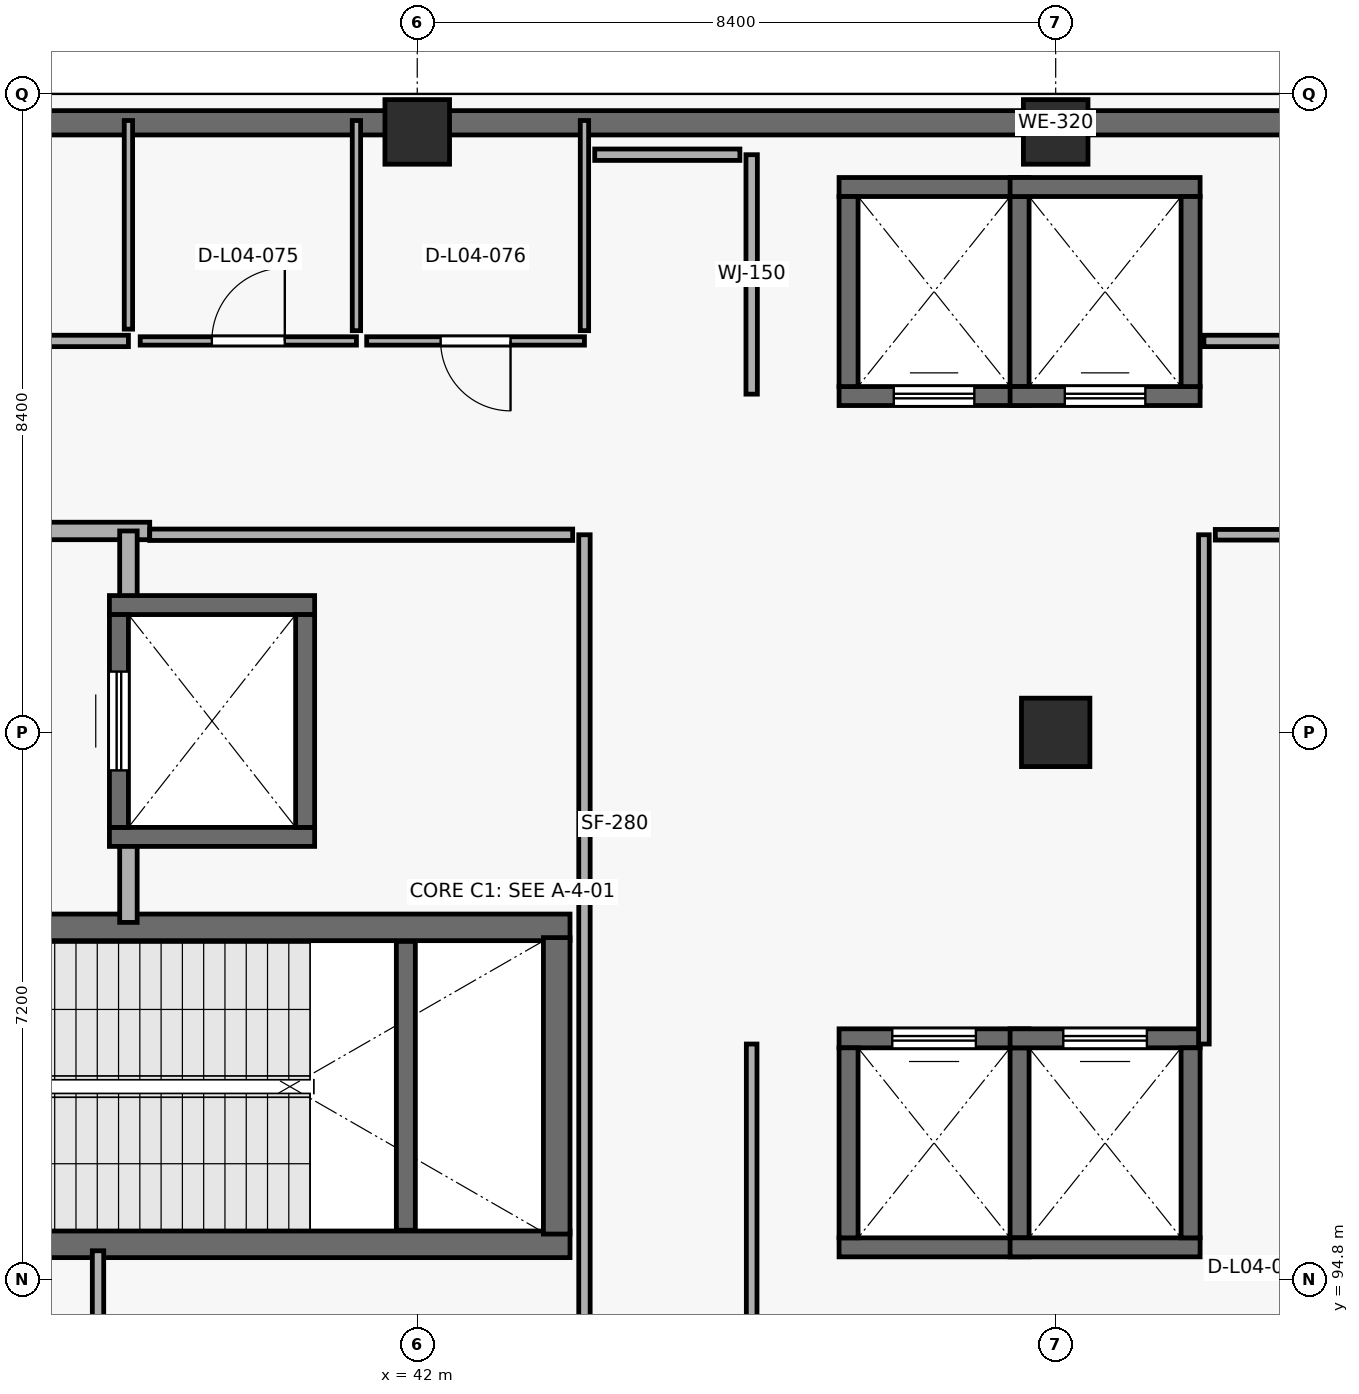
"""IFC4 building model, lengths in metres.
Left out: names, types, materials, properties, quantities, classifications, styles, units other than length and angle.
Written with IfcOpenShell. Run it as: python <this file> out.ifc"""

import sys

from ifc_helpers import new_model, si_unit, direction, frame, frame_2d, origin, origin_2d, place, context, subcontext, project, spatial, rectangle, extrude, element, fill, save


model = new_model("IFC4")
c1 = context("Model", 3, precision=1e-05, world=origin(), true_north=direction((0.0, 1.0)))
c2 = subcontext(c1, "Body", "Model", "MODEL_VIEW")
j1 = project(units=[si_unit("LENGTHUNIT", "METRE"), si_unit("PLANEANGLEUNIT", "RADIAN")], contexts=[c1])
p1 = place(None, origin())
s1 = spatial("IfcSite", under=j1, at=p1, CompositionType="ELEMENT")
p2 = place(p1, origin())
s2 = spatial("IfcBuilding", under=s1, at=p2, CompositionType="ELEMENT")
p3 = place(p2, frame((0.0, 0.0, 15.3)))
s3 = spatial("IfcBuildingStorey", under=s2, at=p3, CompositionType="ELEMENT", Elevation=15.3)
p4 = place(p3, frame((42.0, 109.9, 0.0), z_axis=(0.0, 0.0, 1.0), x_axis=(1.0, 0.0, 0.0)))
e1 = element("IfcColumn", 1, at=p4, inside=s3, PredefinedType="COLUMN", context=c2, shape_type="SweptSolid", body=[
    extrude(rectangle(XDim=0.85, YDim=0.85, at=origin_2d()), origin(), (0.0, 0.0, 1.0), 5.1),
])
p5 = place(p3, frame((50.4, 102.0, 0.0), z_axis=(0.0, 0.0, 1.0), x_axis=(1.0, 0.0, 0.0)))
e2 = element("IfcColumn", 2, at=p5, inside=s3, PredefinedType="COLUMN", context=c2, shape_type="SweptSolid", body=[
    extrude(rectangle(XDim=0.9, YDim=0.9, at=origin_2d()), origin(), (0.0, 0.0, 1.0), 5.1),
])
p6 = place(p3, frame((50.4, 109.9, 0.0), z_axis=(0.0, 0.0, 1.0), x_axis=(1.0, 0.0, 0.0)))
e3 = element("IfcColumn", 3, at=p6, inside=s3, PredefinedType="COLUMN", context=c2, shape_type="SweptSolid", body=[
    extrude(rectangle(XDim=0.85, YDim=0.85, at=origin_2d()), origin(), (0.0, 0.0, 1.0), 5.1),
])
p7 = place(p3, frame((33.6, 110.02, 0.0), z_axis=(0.0, 0.0, 1.0), x_axis=(1.0, 0.0, 0.0)))
e4 = element("IfcWall", 4, at=p7, inside=s3, PredefinedType="SOLIDWALL", context=c2, shape_type="SweptSolid", body=[
    extrude(rectangle(XDim=33.6, YDim=0.32, at=frame_2d((16.8, 0.0))), origin(), (0.0, 0.0, 1.0), 4.82),
])
p8 = place(p3, frame((34.79, 95.265, 0.0), z_axis=(0.0, 0.0, 1.0), x_axis=(1.0, 0.0, 0.0)))
e5 = element("IfcWall", 5, at=p8, inside=s3, PredefinedType="SHEAR", context=c2, shape_type="SweptSolid", body=[
    extrude(rectangle(XDim=9.22, YDim=0.35, at=frame_2d((4.61, 0.0))), origin(), (0.0, 0.0, 1.0), 4.82),
])
p9 = place(p8, frame((0.45, 0.0, 0.0)))
e6 = element("IfcOpeningElement", 6, at=p9, cuts=e5, PredefinedType="OPENING", context=c2, shape_type="SweptSolid", body=[
    extrude(rectangle(XDim=1.25, YDim=2.2, at=frame_2d((0.625, 1.1))), frame((0.0, 0.185, 0.0), z_axis=(0.0, -1.0, 0.0), x_axis=(1.0, 0.0, 0.0)), (0.0, 0.0, 1.0), 0.37),
])
p10 = place(p3, frame((44.01, 99.435, 0.0), z_axis=(0.0, 0.0, 1.0), x_axis=(-1.0, 0.0, 0.0)))
e7 = element("IfcWall", 7, at=p10, inside=s3, PredefinedType="SHEAR", context=c2, shape_type="SweptSolid", body=[
    extrude(rectangle(XDim=9.22, YDim=0.35, at=frame_2d((4.61, 0.0))), origin(), (0.0, 0.0, 1.0), 4.82),
])
p11 = place(p10, frame((7.72, 0.0, 0.0)))
e8 = element("IfcOpeningElement", 8, at=p11, cuts=e7, PredefinedType="OPENING", context=c2, shape_type="SweptSolid", body=[
    extrude(rectangle(XDim=1.2, YDim=2.2, at=frame_2d((0.6, 1.1))), frame((0.0, 0.185, 0.0), z_axis=(0.0, -1.0, 0.0), x_axis=(1.0, 0.0, 0.0)), (0.0, 0.0, 1.0), 0.37),
])
p12 = place(p3, frame((43.835, 99.3, 0.0), z_axis=(0.0, 0.0, 1.0), x_axis=(0.0, -1.0, 0.0)))
e9 = element("IfcWall", 9, at=p12, inside=s3, PredefinedType="SHEAR", context=c2, shape_type="SweptSolid", body=[
    extrude(rectangle(XDim=3.9, YDim=0.35, at=frame_2d((1.95, 0.0))), origin(), (0.0, 0.0, 1.0), 4.82),
])
p13 = place(p3, frame((41.85, 95.45, 0.0), z_axis=(0.0, 0.0, 1.0), x_axis=(0.0, 1.0, 0.0)))
e10 = element("IfcWall", 10, at=p13, inside=s3, PredefinedType="SHEAR", context=c2, shape_type="SweptSolid", body=[
    extrude(rectangle(XDim=3.8, YDim=0.25, at=frame_2d((1.9, 0.0))), origin(), (0.0, 0.0, 1.0), 2.37),
])
p14 = place(p3, frame((34.59, 104.65, 0.0), z_axis=(0.0, 0.0, 1.0), x_axis=(1.0, 0.0, 0.0)))
e11 = element("IfcWall", 11, at=p14, inside=s3, PredefinedType="PARTITIONING", context=c2, shape_type="SweptSolid", body=[
    extrude(rectangle(XDim=3.89, YDim=0.23, at=frame_2d((1.945, 0.0))), origin(), (0.0, 0.0, 1.0), 4.82),
])
p15 = place(p14, frame((1.15, 0.0, 0.0)))
e12 = element("IfcOpeningElement", 12, at=p15, cuts=e11, PredefinedType="OPENING", context=c2, shape_type="SweptSolid", body=[
    extrude(rectangle(XDim=1.2, YDim=2.2, at=frame_2d((0.6, 1.1))), frame((0.0, 0.125, 0.0), z_axis=(0.0, -1.0, 0.0), x_axis=(1.0, 0.0, 0.0)), (0.0, 0.0, 1.0), 0.25),
])
p16 = place(p3, frame((38.2, 104.65, 0.0), z_axis=(0.0, 0.0, 1.0), x_axis=(0.0, -1.0, 0.0)))
e13 = element("IfcWall", 13, at=p16, inside=s3, PredefinedType="PARTITIONING", context=c2, shape_type="SweptSolid", body=[
    extrude(rectangle(XDim=1.1, YDim=0.23, at=frame_2d((0.55, 0.0))), origin(), (0.0, 0.0, 1.0), 4.82),
])
p17 = place(p3, frame((38.2, 100.75, 0.0), z_axis=(0.0, 0.0, 1.0), x_axis=(0.0, -1.0, 0.0)))
e14 = element("IfcWall", 14, at=p17, inside=s3, PredefinedType="PARTITIONING", context=c2, shape_type="SweptSolid", body=[
    extrude(rectangle(XDim=1.25, YDim=0.23, at=frame_2d((0.625, 0.0))), origin(), (0.0, 0.0, 1.0), 4.82),
])
p18 = place(p3, frame((47.55, 95.225, 0.0), z_axis=(0.0, 0.0, 1.0), x_axis=(1.0, 0.0, 0.0)))
e15 = element("IfcWall", 15, at=p18, inside=s3, PredefinedType="SHEAR", context=c2, shape_type="SweptSolid", body=[
    extrude(rectangle(XDim=2.5, YDim=0.25, at=frame_2d((1.25, 0.0))), origin(), (0.0, 0.0, 1.0), 4.82),
])
p19 = place(p3, frame((50.05, 97.975, 0.0), z_axis=(0.0, 0.0, 1.0), x_axis=(-1.0, 0.0, 0.0)))
e16 = element("IfcWall", 16, at=p19, inside=s3, PredefinedType="SHEAR", context=c2, shape_type="SweptSolid", body=[
    extrude(rectangle(XDim=2.5, YDim=0.25, at=frame_2d((1.25, 0.0))), origin(), (0.0, 0.0, 1.0), 4.82),
])
p20 = place(p19, frame((0.7, 0.0, 0.0)))
e17 = element("IfcOpeningElement", 17, at=p20, cuts=e16, PredefinedType="OPENING", context=c2, shape_type="SweptSolid", body=[
    extrude(rectangle(XDim=1.1, YDim=2.2, at=frame_2d((0.55, 1.1))), frame((0.0, 0.135, 0.0), z_axis=(0.0, -1.0, 0.0), x_axis=(1.0, 0.0, 0.0)), (0.0, 0.0, 1.0), 0.27),
])
for number, where, z_axis, x_axis in (
    (18, (47.675, 95.35, 0.0), (0.0, 0.0, 1.0), (0.0, 1.0, 0.0)),
    (19, (49.925, 97.85, 0.0), (0.0, 0.0, 1.0), (0.0, -1.0, 0.0)),
    (20, (49.8, 95.225, 0.0), (0.0, 0.0, 1.0), (1.0, 0.0, 0.0)),
):
    element("IfcWall", number, at=place(p3, frame(where, z_axis=z_axis, x_axis=x_axis)), inside=s3, PredefinedType="SHEAR", context=c2, shape_type="SweptSolid", body=[
        extrude(rectangle(XDim=2.5, YDim=0.25, at=frame_2d((1.25, 0.0))), origin(), (0.0, 0.0, 1.0), 4.82),
    ])
p21 = place(p3, frame((52.3, 97.975, 0.0), z_axis=(0.0, 0.0, 1.0), x_axis=(-1.0, 0.0, 0.0)))
e21 = element("IfcWall", 21, at=p21, inside=s3, PredefinedType="SHEAR", context=c2, shape_type="SweptSolid", body=[
    extrude(rectangle(XDim=2.5, YDim=0.25, at=frame_2d((1.25, 0.0))), origin(), (0.0, 0.0, 1.0), 4.82),
])
p22 = place(p21, frame((0.7, 0.0, 0.0)))
e22 = element("IfcOpeningElement", 22, at=p22, cuts=e21, PredefinedType="OPENING", context=c2, shape_type="SweptSolid", body=[
    extrude(rectangle(XDim=1.1, YDim=2.2, at=frame_2d((0.55, 1.1))), frame((0.0, 0.135, 0.0), z_axis=(0.0, -1.0, 0.0), x_axis=(1.0, 0.0, 0.0)), (0.0, 0.0, 1.0), 0.27),
])
p23 = place(p3, frame((52.175, 97.85, 0.0), z_axis=(0.0, 0.0, 1.0), x_axis=(0.0, -1.0, 0.0)))
e23 = element("IfcWall", 23, at=p23, inside=s3, PredefinedType="SHEAR", context=c2, shape_type="SweptSolid", body=[
    extrude(rectangle(XDim=2.5, YDim=0.25, at=frame_2d((1.25, 0.0))), origin(), (0.0, 0.0, 1.0), 4.82),
])
p24 = place(p3, frame((47.55, 106.425, 0.0), z_axis=(0.0, 0.0, 1.0), x_axis=(1.0, 0.0, 0.0)))
e24 = element("IfcWall", 24, at=p24, inside=s3, PredefinedType="SHEAR", context=c2, shape_type="SweptSolid", body=[
    extrude(rectangle(XDim=2.5, YDim=0.25, at=frame_2d((1.25, 0.0))), origin(), (0.0, 0.0, 1.0), 4.82),
])
p25 = place(p24, frame((0.72, 0.0, 0.0)))
e25 = element("IfcOpeningElement", 25, at=p25, cuts=e24, PredefinedType="OPENING", context=c2, shape_type="SweptSolid", body=[
    extrude(rectangle(XDim=1.06, YDim=2.2, at=frame_2d((0.53, 1.1))), frame((0.0, 0.135, 0.0), z_axis=(0.0, -1.0, 0.0), x_axis=(1.0, 0.0, 0.0)), (0.0, 0.0, 1.0), 0.27),
])
for number, where, z_axis, x_axis in (
    (26, (50.05, 109.175, 0.0), (0.0, 0.0, 1.0), (-1.0, 0.0, 0.0)),
    (27, (47.675, 106.55, 0.0), (0.0, 0.0, 1.0), (0.0, 1.0, 0.0)),
    (28, (49.925, 109.05, 0.0), (0.0, 0.0, 1.0), (0.0, -1.0, 0.0)),
):
    element("IfcWall", number, at=place(p3, frame(where, z_axis=z_axis, x_axis=x_axis)), inside=s3, PredefinedType="SHEAR", context=c2, shape_type="SweptSolid", body=[
        extrude(rectangle(XDim=2.5, YDim=0.25, at=frame_2d((1.25, 0.0))), origin(), (0.0, 0.0, 1.0), 4.82),
    ])
p26 = place(p3, frame((49.8, 106.425, 0.0), z_axis=(0.0, 0.0, 1.0), x_axis=(1.0, 0.0, 0.0)))
e29 = element("IfcWall", 29, at=p26, inside=s3, PredefinedType="SHEAR", context=c2, shape_type="SweptSolid", body=[
    extrude(rectangle(XDim=2.5, YDim=0.25, at=frame_2d((1.25, 0.0))), origin(), (0.0, 0.0, 1.0), 4.82),
])
p27 = place(p26, frame((0.72, 0.0, 0.0)))
e30 = element("IfcOpeningElement", 30, at=p27, cuts=e29, PredefinedType="OPENING", context=c2, shape_type="SweptSolid", body=[
    extrude(rectangle(XDim=1.06, YDim=2.2, at=frame_2d((0.53, 1.1))), frame((0.0, 0.135, 0.0), z_axis=(0.0, -1.0, 0.0), x_axis=(1.0, 0.0, 0.0)), (0.0, 0.0, 1.0), 0.27),
])
for number, where, z_axis, x_axis in (
    (31, (52.3, 109.175, 0.0), (0.0, 0.0, 1.0), (-1.0, 0.0, 0.0)),
    (32, (52.175, 109.05, 0.0), (0.0, 0.0, 1.0), (0.0, -1.0, 0.0)),
):
    element("IfcWall", number, at=place(p3, frame(where, z_axis=z_axis, x_axis=x_axis)), inside=s3, PredefinedType="SHEAR", context=c2, shape_type="SweptSolid", body=[
        extrude(rectangle(XDim=2.5, YDim=0.25, at=frame_2d((1.25, 0.0))), origin(), (0.0, 0.0, 1.0), 4.82),
    ])
for number, where, z_axis, x_axis in (
    (33, (37.95, 100.625, 0.0), (0.0, 0.0, 1.0), (1.0, 0.0, 0.0)),
    (34, (40.65, 103.675, 0.0), (0.0, 0.0, 1.0), (-1.0, 0.0, 0.0)),
):
    element("IfcWall", number, at=place(p3, frame(where, z_axis=z_axis, x_axis=x_axis)), inside=s3, PredefinedType="SHEAR", context=c2, shape_type="SweptSolid", body=[
        extrude(rectangle(XDim=2.7, YDim=0.25, at=frame_2d((1.35, 0.0))), origin(), (0.0, 0.0, 1.0), 4.82),
    ])
p28 = place(p3, frame((38.075, 100.75, 0.0), z_axis=(0.0, 0.0, 1.0), x_axis=(0.0, 1.0, 0.0)))
e35 = element("IfcWall", 35, at=p28, inside=s3, PredefinedType="SHEAR", context=c2, shape_type="SweptSolid", body=[
    extrude(rectangle(XDim=2.8, YDim=0.25, at=frame_2d((1.4, 0.0))), origin(), (0.0, 0.0, 1.0), 4.82),
])
p29 = place(p28, frame((0.75, 0.0, 0.0)))
e36 = element("IfcOpeningElement", 36, at=p29, cuts=e35, PredefinedType="OPENING", context=c2, shape_type="SweptSolid", body=[
    extrude(rectangle(XDim=1.3, YDim=2.25, at=frame_2d((0.65, 1.125))), frame((0.0, 0.135, 0.0), z_axis=(0.0, -1.0, 0.0), x_axis=(1.0, 0.0, 0.0)), (0.0, 0.0, 1.0), 0.27),
])
p30 = place(p3, frame((40.525, 103.55, 0.0), z_axis=(0.0, 0.0, 1.0), x_axis=(0.0, -1.0, 0.0)))
e37 = element("IfcWall", 37, at=p30, inside=s3, PredefinedType="SHEAR", context=c2, shape_type="SweptSolid", body=[
    extrude(rectangle(XDim=2.8, YDim=0.25, at=frame_2d((1.4, 0.0))), origin(), (0.0, 0.0, 1.0), 4.82),
])
p31 = place(p3, frame((64.35, 107.15, 0.0), z_axis=(0.0, 0.0, 1.0), x_axis=(-1.0, 0.0, 0.0)))
e38 = element("IfcWall", 38, at=p31, inside=s3, PredefinedType="PARTITIONING", context=c2, shape_type="SweptSolid", body=[
    extrude(rectangle(XDim=12.0, YDim=0.15, at=frame_2d((6.0, 0.0))), origin(), (0.0, 0.0, 1.0), 4.82),
])
p32 = place(p3, frame((44.2, 104.6, 0.0), z_axis=(0.0, 0.0, 1.0), x_axis=(0.0, -1.0, 0.0)))
e39 = element("IfcWall", 39, at=p32, inside=s3, PredefinedType="PARTITIONING", context=c2, shape_type="SweptSolid", body=[
    extrude(rectangle(XDim=10.75, YDim=0.15, at=frame_2d((5.375, 0.0))), origin(), (0.0, 0.0, 1.0), 4.82),
])
p33 = place(p3, frame((52.35, 97.9, 0.0), z_axis=(0.0, 0.0, 1.0), x_axis=(0.0, 1.0, 0.0)))
e40 = element("IfcWall", 40, at=p33, inside=s3, PredefinedType="PARTITIONING", context=c2, shape_type="SweptSolid", body=[
    extrude(rectangle(XDim=6.7, YDim=0.14, at=frame_2d((3.35, 0.0))), origin(), (0.0, 0.0, 1.0), 4.82),
])
p34 = place(p3, frame((38.48, 104.6, 0.0), z_axis=(0.0, 0.0, 1.0), x_axis=(1.0, 0.0, 0.0)))
e41 = element("IfcWall", 41, at=p34, inside=s3, PredefinedType="PARTITIONING", context=c2, shape_type="SweptSolid", body=[
    extrude(rectangle(XDim=5.565, YDim=0.15, at=frame_2d((2.782, 0.0))), origin(), (0.0, 0.0, 1.0), 4.82),
])
p35 = place(p3, frame((46.4, 94.0, 0.0), z_axis=(0.0, 0.0, 1.0), x_axis=(0.0, 1.0, 0.0)))
e42 = element("IfcWall", 42, at=p35, inside=s3, PredefinedType="PARTITIONING", context=c2, shape_type="SweptSolid", body=[
    extrude(rectangle(XDim=3.9, YDim=0.14, at=frame_2d((1.95, 0.0))), origin(), (0.0, 0.0, 1.0), 4.82),
])
p36 = place(p3, frame((38.2, 107.15, 0.0), z_axis=(0.0, 0.0, 1.0), x_axis=(-1.0, 0.0, 0.0)))
e43 = element("IfcWall", 43, at=p36, inside=s3, PredefinedType="PARTITIONING", context=c2, shape_type="SweptSolid", body=[
    extrude(rectangle(XDim=3.6, YDim=0.15, at=frame_2d((1.8, 0.0))), origin(), (0.0, 0.0, 1.0), 4.82),
])
p37 = place(p3, frame((46.4, 106.45, 0.0), z_axis=(0.0, 0.0, 1.0), x_axis=(0.0, 1.0, 0.0)))
e44 = element("IfcWall", 44, at=p37, inside=s3, PredefinedType="PARTITIONING", context=c2, shape_type="SweptSolid", body=[
    extrude(rectangle(XDim=3.15, YDim=0.15, at=frame_2d((1.575, 0.0))), origin(), (0.0, 0.0, 1.0), 4.82),
])
p38 = place(p3, frame((41.2, 107.15, 0.0), z_axis=(0.0, 0.0, 1.0), x_axis=(-1.0, 0.0, 0.0)))
e45 = element("IfcWall", 45, at=p38, inside=s3, PredefinedType="PARTITIONING", context=c2, shape_type="SweptSolid", body=[
    extrude(rectangle(XDim=2.845, YDim=0.11, at=frame_2d((1.422, 0.0))), origin(), (0.0, 0.0, 1.0), 4.82),
])
p39 = place(p38, frame((0.942, 0.0, 0.0)))
e46 = element("IfcOpeningElement", 46, at=p39, cuts=e45, PredefinedType="OPENING", context=c2, shape_type="SweptSolid", body=[
    extrude(rectangle(XDim=0.96, YDim=2.14, at=frame_2d((0.48, 1.07))), frame((0.0, 0.065, 0.0), z_axis=(0.0, -1.0, 0.0), x_axis=(1.0, 0.0, 0.0)), (0.0, 0.0, 1.0), 0.13),
])
p40 = place(p3, frame((44.2, 107.15, 0.0), z_axis=(0.0, 0.0, 1.0), x_axis=(-1.0, 0.0, 0.0)))
e47 = element("IfcWall", 47, at=p40, inside=s3, PredefinedType="PARTITIONING", context=c2, shape_type="SweptSolid", body=[
    extrude(rectangle(XDim=2.865, YDim=0.11, at=frame_2d((1.433, 0.0))), origin(), (0.0, 0.0, 1.0), 4.82),
])
p41 = place(p40, frame((0.972, 0.0, 0.0)))
e48 = element("IfcOpeningElement", 48, at=p41, cuts=e47, PredefinedType="OPENING", context=c2, shape_type="SweptSolid", body=[
    extrude(rectangle(XDim=0.92, YDim=2.12, at=frame_2d((0.46, 1.06))), frame((0.0, 0.065, 0.0), z_axis=(0.0, -1.0, 0.0), x_axis=(1.0, 0.0, 0.0)), (0.0, 0.0, 1.0), 0.13),
])
p42 = place(p3, frame((41.2, 110.05, 0.0), z_axis=(0.0, 0.0, 1.0), x_axis=(0.0, -1.0, 0.0)))
e49 = element("IfcWall", 49, at=p42, inside=s3, PredefinedType="PARTITIONING", context=c2, shape_type="SweptSolid", body=[
    extrude(rectangle(XDim=2.765, YDim=0.11, at=frame_2d((1.383, 0.0))), origin(), (0.0, 0.0, 1.0), 4.82),
])
p43 = place(p3, frame((38.2, 107.305, 0.0), z_axis=(0.0, 0.0, 1.0), x_axis=(0.0, 1.0, 0.0)))
e50 = element("IfcWall", 50, at=p43, inside=s3, PredefinedType="PARTITIONING", context=c2, shape_type="SweptSolid", body=[
    extrude(rectangle(XDim=2.745, YDim=0.11, at=frame_2d((1.373, 0.0))), origin(), (0.0, 0.0, 1.0), 4.82),
])
p44 = place(p3, frame((44.2, 110.05, 0.0), z_axis=(0.0, 0.0, 1.0), x_axis=(0.0, -1.0, 0.0)))
e51 = element("IfcWall", 51, at=p44, inside=s3, PredefinedType="PARTITIONING", context=c2, shape_type="SweptSolid", body=[
    extrude(rectangle(XDim=2.765, YDim=0.11, at=frame_2d((1.383, 0.0))), origin(), (0.0, 0.0, 1.0), 4.82),
])
p45 = place(p3, frame((52.5, 104.6, 0.0), z_axis=(0.0, 0.0, 1.0), x_axis=(1.0, 0.0, 0.0)))
e52 = element("IfcWall", 52, at=p45, inside=s3, PredefinedType="PARTITIONING", context=c2, shape_type="SweptSolid", body=[
    extrude(rectangle(XDim=2.58, YDim=0.14, at=frame_2d((1.29, 0.0))), origin(), (0.0, 0.0, 1.0), 4.82),
])
p46 = place(p3, frame((46.245, 109.6, 0.0), z_axis=(0.0, 0.0, 1.0), x_axis=(-1.0, 0.0, 0.0)))
e53 = element("IfcWall", 53, at=p46, inside=s3, PredefinedType="PARTITIONING", context=c2, shape_type="SweptSolid", body=[
    extrude(rectangle(XDim=1.91, YDim=0.15, at=frame_2d((0.955, 0.0))), origin(), (0.0, 0.0, 1.0), 3.9),
])
p47 = place(p3, frame((37.8, 94.005, 0.0), z_axis=(0.0, 0.0, 1.0), x_axis=(0.0, 1.0, 0.0)))
e54 = element("IfcWall", 54, at=p47, inside=s3, PredefinedType="PARTITIONING", context=c2, shape_type="SweptSolid", body=[
    extrude(rectangle(XDim=1.175, YDim=0.15, at=frame_2d((0.587, 0.0))), origin(), (0.0, 0.0, 1.0), 4.82),
])
p48 = place(p20, origin())
e55 = element("IfcDoor", 55, at=p48, inside=s3, OperationType="SLIDING_TO_LEFT", PredefinedType="DOOR", context=c2, shape_type="SweptSolid", body=[
    extrude(rectangle(XDim=1.1, YDim=2.2, at=frame_2d((0.55, 1.1))), frame((0.0, 0.025, 0.0), z_axis=(0.0, -1.0, 0.0), x_axis=(1.0, 0.0, 0.0)), (0.0, 0.0, 1.0), 0.05),
])
fill(e17, e55)
p49 = place(p22, origin())
e56 = element("IfcDoor", 56, at=p49, inside=s3, OperationType="SLIDING_TO_LEFT", PredefinedType="DOOR", context=c2, shape_type="SweptSolid", body=[
    extrude(rectangle(XDim=1.1, YDim=2.2, at=frame_2d((0.55, 1.1))), frame((0.0, 0.025, 0.0), z_axis=(0.0, -1.0, 0.0), x_axis=(1.0, 0.0, 0.0)), (0.0, 0.0, 1.0), 0.05),
])
fill(e22, e56)
p50 = place(p25, origin())
e57 = element("IfcDoor", 57, at=p50, inside=s3, OperationType="SLIDING_TO_LEFT", PredefinedType="DOOR", context=c2, shape_type="SweptSolid", body=[
    extrude(rectangle(XDim=1.06, YDim=2.2, at=frame_2d((0.53, 1.1))), frame((0.0, 0.025, 0.0), z_axis=(0.0, -1.0, 0.0), x_axis=(1.0, 0.0, 0.0)), (0.0, 0.0, 1.0), 0.05),
])
fill(e25, e57)
p51 = place(p27, origin())
e58 = element("IfcDoor", 58, at=p51, inside=s3, OperationType="SLIDING_TO_LEFT", PredefinedType="DOOR", context=c2, shape_type="SweptSolid", body=[
    extrude(rectangle(XDim=1.06, YDim=2.2, at=frame_2d((0.53, 1.1))), frame((0.0, 0.025, 0.0), z_axis=(0.0, -1.0, 0.0), x_axis=(1.0, 0.0, 0.0)), (0.0, 0.0, 1.0), 0.05),
])
fill(e30, e58)
p52 = place(p29, origin())
e59 = element("IfcDoor", 59, at=p52, inside=s3, OperationType="SLIDING_TO_LEFT", PredefinedType="DOOR", context=c2, shape_type="SweptSolid", body=[
    extrude(rectangle(XDim=1.3, YDim=2.25, at=frame_2d((0.65, 1.125))), frame((0.0, 0.025, 0.0), z_axis=(0.0, -1.0, 0.0), x_axis=(1.0, 0.0, 0.0)), (0.0, 0.0, 1.0), 0.05),
])
fill(e36, e59)
p53 = place(p39, origin())
e60 = element("IfcDoor", 60, at=p53, inside=s3, OperationType="SINGLE_SWING_RIGHT", PredefinedType="DOOR", context=c2, shape_type="SweptSolid", body=[
    extrude(rectangle(XDim=0.96, YDim=2.14, at=frame_2d((0.48, 1.07))), frame((0.0, 0.025, 0.0), z_axis=(0.0, -1.0, 0.0), x_axis=(1.0, 0.0, 0.0)), (0.0, 0.0, 1.0), 0.05),
])
fill(e46, e60)
p54 = place(p41, origin())
e61 = element("IfcDoor", 61, at=p54, inside=s3, OperationType="SINGLE_SWING_LEFT", PredefinedType="DOOR", context=c2, shape_type="SweptSolid", body=[
    extrude(rectangle(XDim=0.92, YDim=2.12, at=frame_2d((0.46, 1.06))), frame((0.0, 0.025, 0.0), z_axis=(0.0, -1.0, 0.0), x_axis=(1.0, 0.0, 0.0)), (0.0, 0.0, 1.0), 0.05),
])
fill(e48, e61)
save(model, sys.argv[1])
